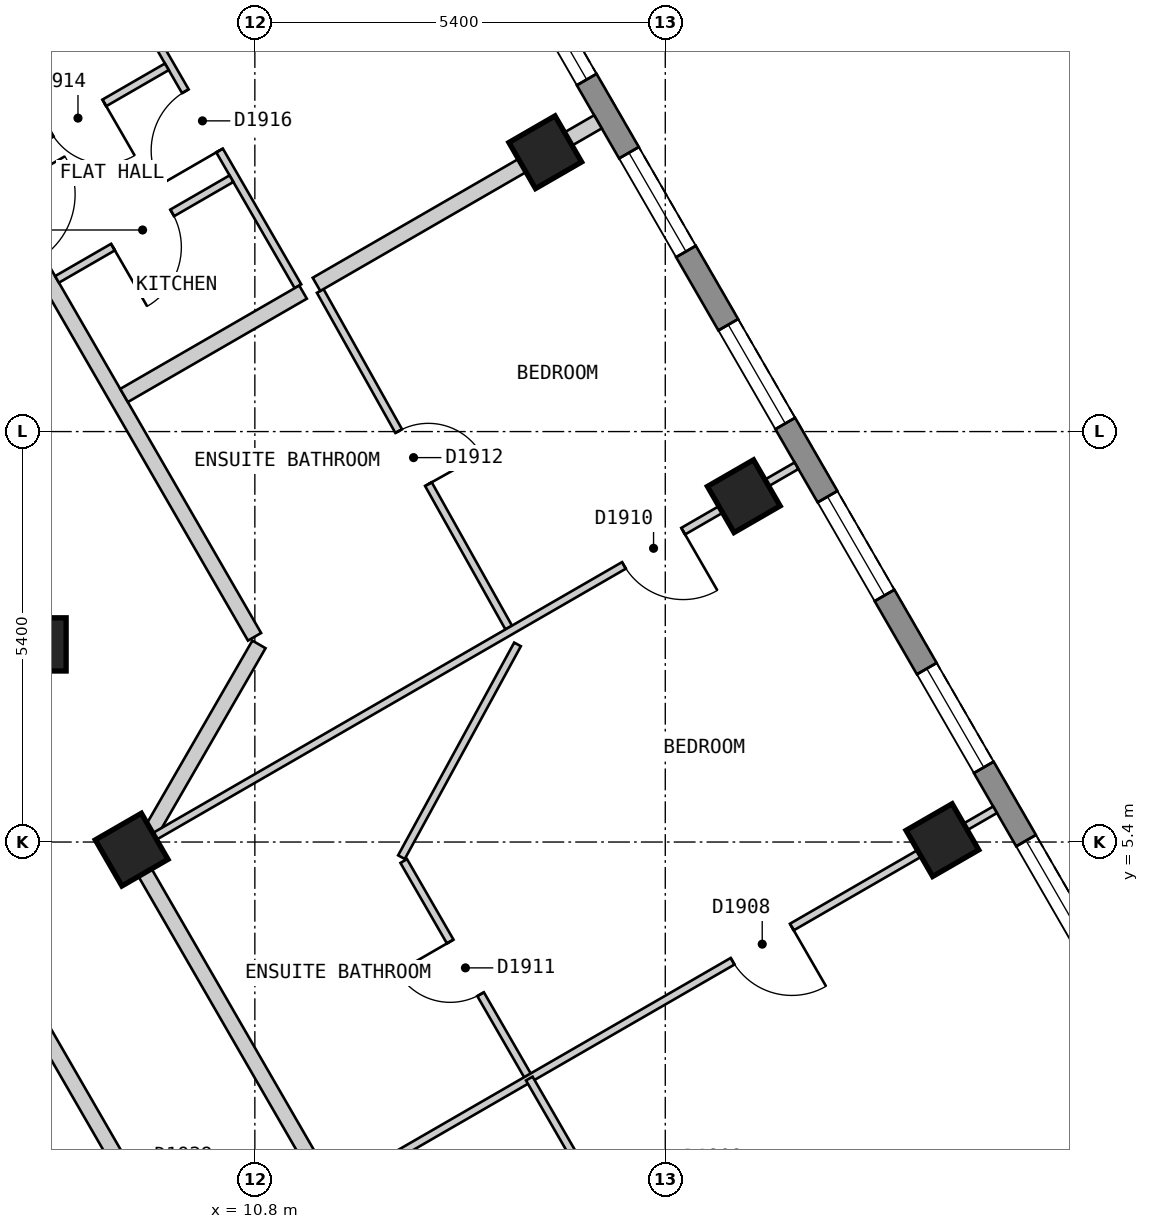
"""IFC4 building model, lengths in metres.
Left out: names, types, materials, properties, quantities, classifications, styles, units other than length and angle.
Written with IfcOpenShell. Run it as: python <this file> out.ifc"""

import sys

from ifc_helpers import new_model, si_unit, direction, frame, frame_2d, origin, origin_2d, place, context, subcontext, project, spatial, polyline, rectangle, outline, extrude, element, fill, save


model = new_model("IFC4")
c1 = context("Model", 3, precision=1e-05, world=origin(), true_north=direction((0.0, 1.0)))
c2 = subcontext(c1, "Body", "Model", "MODEL_VIEW")
j1 = project(units=[si_unit("LENGTHUNIT", "METRE"), si_unit("PLANEANGLEUNIT", "RADIAN")], contexts=[c1])
p1 = place(None, origin())
s1 = spatial("IfcSite", under=j1, at=p1, CompositionType="ELEMENT")
p2 = place(p1, origin())
s2 = spatial("IfcBuilding", under=s1, at=p2, CompositionType="ELEMENT")
p3 = place(p2, frame((0.0, 0.0, 226.8)))
s3 = spatial("IfcBuildingStorey", under=s2, at=p3, CompositionType="ELEMENT", Elevation=226.8)
for number, where, z_axis, x_axis in (
    (1, (19.846, 5.425, 0.0), (0.0, 0.0, 1.0), (-0.5, 0.866, 0.0)),
    (2, (17.233, 9.95, 0.0), (0.0, 0.0, 1.0), (-0.5, 0.866, 0.0)),
    (3, (14.621, 14.475, 0.0), (0.0, 0.0, 1.0), (-0.5, 0.866, 0.0)),
    (4, (9.179, 5.3, 0.0), (0.0, 0.0, 1.0), (-0.5, 0.866, 0.0)),
    (5, (7.967, 8.0, 0.0), (0.0, 0.0, 1.0), (1.0, 0.0, 0.0)),
):
    element("IfcColumn", number, at=place(p3, frame(where, z_axis=z_axis, x_axis=x_axis)), inside=s3, PredefinedType="COLUMN", context=c2, shape_type="SweptSolid", body=[
        extrude(rectangle(XDim=0.7, YDim=0.7, at=origin_2d()), origin(), (0.0, 0.0, 1.0), 3.0),
    ])
p4 = place(p3, frame((23.599, 0.825, 0.0), z_axis=(0.0, 0.0, 1.0), x_axis=(-0.500003656944, 0.866023292436, 0.0)))
e6 = element("IfcWall", 6, at=p4, inside=s3, PredefinedType="SOLIDWALL", context=c2, shape_type="SweptSolid", body=[
    extrude(outline(polyline([(0.0, -0.15), (22.17, -0.15), (22.09, 0.15), (0.08, 0.15), (0.0, -0.15)])), origin(), (0.0, 0.0, 1.0), 2.7),
])
p5 = place(p4, frame((1.191, 0.0, 0.15)))
e7 = element("IfcOpeningElement", 7, at=p5, cuts=e6, PredefinedType="OPENING", context=c2, shape_type="SweptSolid", body=[
    extrude(rectangle(XDim=1.5, YDim=2.1, at=frame_2d((0.75, 1.05))), frame((0.0, 0.16, 0.0), z_axis=(0.0, -1.0, 0.0), x_axis=(1.0, 0.0, 0.0)), (0.0, 0.0, 1.0), 0.32),
])
p6 = place(p4, frame((3.804, 0.0, 0.15)))
e8 = element("IfcOpeningElement", 8, at=p6, cuts=e6, PredefinedType="OPENING", context=c2, shape_type="SweptSolid", body=[
    extrude(rectangle(XDim=1.5, YDim=2.1, at=frame_2d((0.75, 1.05))), frame((0.0, 0.16, 0.0), z_axis=(0.0, -1.0, 0.0), x_axis=(1.0, 0.0, 0.0)), (0.0, 0.0, 1.0), 0.32),
])
p7 = place(p4, frame((6.417, 0.0, 0.15)))
e9 = element("IfcOpeningElement", 9, at=p7, cuts=e6, PredefinedType="OPENING", context=c2, shape_type="SweptSolid", body=[
    extrude(rectangle(XDim=1.5, YDim=2.1, at=frame_2d((0.75, 1.05))), frame((0.0, 0.16, 0.0), z_axis=(0.0, -1.0, 0.0), x_axis=(1.0, 0.0, 0.0)), (0.0, 0.0, 1.0), 0.32),
])
p8 = place(p4, frame((9.029, 0.0, 0.15)))
e10 = element("IfcOpeningElement", 10, at=p8, cuts=e6, PredefinedType="OPENING", context=c2, shape_type="SweptSolid", body=[
    extrude(rectangle(XDim=1.5, YDim=2.1, at=frame_2d((0.75, 1.05))), frame((0.0, 0.16, 0.0), z_axis=(0.0, -1.0, 0.0), x_axis=(1.0, 0.0, 0.0)), (0.0, 0.0, 1.0), 0.32),
])
p9 = place(p4, frame((11.641, 0.0, 0.15)))
e11 = element("IfcOpeningElement", 11, at=p9, cuts=e6, PredefinedType="OPENING", context=c2, shape_type="SweptSolid", body=[
    extrude(rectangle(XDim=1.5, YDim=2.1, at=frame_2d((0.75, 1.05))), frame((0.0, 0.16, 0.0), z_axis=(0.0, -1.0, 0.0), x_axis=(1.0, 0.0, 0.0)), (0.0, 0.0, 1.0), 0.32),
])
p10 = place(p4, frame((14.254, 0.0, 0.15)))
e12 = element("IfcOpeningElement", 12, at=p10, cuts=e6, PredefinedType="OPENING", context=c2, shape_type="SweptSolid", body=[
    extrude(rectangle(XDim=1.5, YDim=2.1, at=frame_2d((0.75, 1.05))), frame((0.0, 0.16, 0.0), z_axis=(0.0, -1.0, 0.0), x_axis=(1.0, 0.0, 0.0)), (0.0, 0.0, 1.0), 0.32),
])
p11 = place(p4, frame((16.866, 0.0, 0.15)))
e13 = element("IfcOpeningElement", 13, at=p11, cuts=e6, PredefinedType="OPENING", context=c2, shape_type="SweptSolid", body=[
    extrude(rectangle(XDim=1.5, YDim=2.1, at=frame_2d((0.75, 1.05))), frame((0.0, 0.16, 0.0), z_axis=(0.0, -1.0, 0.0), x_axis=(1.0, 0.0, 0.0)), (0.0, 0.0, 1.0), 0.32),
])
p12 = place(p4, frame((19.479, 0.0, 0.15)))
e14 = element("IfcOpeningElement", 14, at=p12, cuts=e6, PredefinedType="OPENING", context=c2, shape_type="SweptSolid", body=[
    extrude(rectangle(XDim=1.5, YDim=2.1, at=frame_2d((0.75, 1.05))), frame((0.0, 0.16, 0.0), z_axis=(0.0, -1.0, 0.0), x_axis=(1.0, 0.0, 0.0)), (0.0, 0.0, 1.0), 0.32),
])
p13 = place(p3, frame((8.026, 2.899, 0.0), z_axis=(0.0, 0.0, 1.0), x_axis=(0.499986018985, -0.866033475577, 0.0)))
e15 = element("IfcWall", 15, at=p13, inside=s3, PredefinedType="PARTITIONING", context=c2, shape_type="SweptSolid", body=[
    extrude(rectangle(XDim=5.078, YDim=0.2, at=frame_2d((2.539, 0.0))), origin(), (0.0, 0.0, 1.0), 2.7),
])
p14 = place(p13, frame((2.089, 0.0, 0.0)))
e16 = element("IfcOpeningElement", 16, at=p14, cuts=e15, PredefinedType="OPENING", context=c2, shape_type="SweptSolid", body=[
    extrude(rectangle(XDim=0.9, YDim=2.1, at=frame_2d((0.45, 1.05))), frame((0.0, 0.11, 0.0), z_axis=(0.0, -1.0, 0.0), x_axis=(1.0, 0.0, 0.0)), (0.0, 0.0, 1.0), 0.22),
])
p15 = place(p3, frame((9.238, 5.2, 0.0), z_axis=(0.0, 0.0, 1.0), x_axis=(0.500025705601, -0.86601056214, 0.0)))
e17 = element("IfcWall", 17, at=p15, inside=s3, PredefinedType="PARTITIONING", context=c2, shape_type="SweptSolid", body=[
    extrude(rectangle(XDim=7.735, YDim=0.2, at=frame_2d((3.868, 0.0))), origin(), (0.0, 0.0, 1.0), 2.7),
])
p16 = place(p3, frame((5.485, 17.3, 0.0), z_axis=(0.0, 0.0, 1.0), x_axis=(0.499943285704, -0.866058145322, 0.0)))
e18 = element("IfcWall", 18, at=p16, inside=s3, PredefinedType="PARTITIONING", context=c2, shape_type="SweptSolid", body=[
    extrude(rectangle(XDim=10.623, YDim=0.2, at=frame_2d((5.312, 0.0))), origin(), (0.0, 0.0, 1.0), 2.7),
])
p17 = place(p16, frame((3.901, 0.0, 0.0)))
e19 = element("IfcOpeningElement", 19, at=p17, cuts=e18, PredefinedType="OPENING", context=c2, shape_type="SweptSolid", body=[
    extrude(rectangle(XDim=1.0, YDim=2.1, at=frame_2d((0.5, 1.05))), frame((0.0, 0.11, 0.0), z_axis=(0.0, -1.0, 0.0), x_axis=(1.0, 0.0, 0.0)), (0.0, 0.0, 1.0), 0.22),
])
p18 = place(p3, frame((9.404, 5.487, 0.0), z_axis=(0.0, 0.0, 1.0), x_axis=(0.499768590677, 0.866158966803, 0.0)))
e20 = element("IfcWall", 20, at=p18, inside=s3, PredefinedType="PARTITIONING", context=c2, shape_type="SweptSolid", body=[
    extrude(rectangle(XDim=2.901, YDim=0.2, at=frame_2d((1.451, 0.0))), origin(), (0.0, 0.0, 1.0), 2.7),
])
p19 = place(p3, frame((12.759, 5.15, 0.0), z_axis=(0.0, 0.0, 1.0), x_axis=(0.499905801698, -0.866079782369, 0.0)))
e21 = element("IfcWall", 21, at=p19, inside=s3, PredefinedType="PARTITIONING", context=c2, shape_type="SweptSolid", body=[
    extrude(rectangle(XDim=3.304, YDim=0.1, at=frame_2d((1.652, 0.0))), origin(), (0.0, 0.0, 1.0), 2.7),
])
p20 = place(p19, frame((1.223, 0.0, 0.0)))
e22 = element("IfcOpeningElement", 22, at=p20, cuts=e21, PredefinedType="OPENING", context=c2, shape_type="SweptSolid", body=[
    extrude(rectangle(XDim=0.8, YDim=2.1, at=frame_2d((0.4, 1.05))), frame((0.0, 0.06, 0.0), z_axis=(0.0, -1.0, 0.0), x_axis=(1.0, 0.0, 0.0)), (0.0, 0.0, 1.0), 0.12),
])
p21 = place(p3, frame((8.854, 17.064, 0.0), z_axis=(0.0, 0.0, 1.0), x_axis=(0.500042049778, -0.866001124973, 0.0)))
e23 = element("IfcWall", 23, at=p21, inside=s3, PredefinedType="PARTITIONING", context=c2, shape_type="SweptSolid", body=[
    extrude(rectangle(XDim=5.025, YDim=0.1, at=frame_2d((2.513, 0.0))), origin(), (0.0, 0.0, 1.0), 2.7),
])
p22 = place(p21, frame((2.063, 0.0, 0.0)))
e24 = element("IfcOpeningElement", 24, at=p22, cuts=e23, PredefinedType="OPENING", context=c2, shape_type="SweptSolid", body=[
    extrude(rectangle(XDim=0.9, YDim=2.1, at=frame_2d((0.45, 1.05))), frame((0.0, 0.06, 0.0), z_axis=(0.0, -1.0, 0.0), x_axis=(1.0, 0.0, 0.0)), (0.0, 0.0, 1.0), 0.12),
])
p23 = place(p3, frame((11.66, 12.65, 0.0), z_axis=(0.0, 0.0, 1.0), x_axis=(0.488650242737, -0.872479764965, 0.0)))
e25 = element("IfcWall", 25, at=p23, inside=s3, PredefinedType="PARTITIONING", context=c2, shape_type="SweptSolid", body=[
    extrude(rectangle(XDim=5.075, YDim=0.1, at=frame_2d((2.538, 0.0))), origin(), (0.0, 0.0, 1.0), 2.7),
])
p24 = place(p23, frame((2.113, 0.0, 0.0)))
e26 = element("IfcOpeningElement", 26, at=p24, cuts=e25, PredefinedType="OPENING", context=c2, shape_type="SweptSolid", body=[
    extrude(rectangle(XDim=0.8, YDim=2.1, at=frame_2d((0.4, 1.05))), frame((0.0, 0.06, 0.0), z_axis=(0.0, -1.0, 0.0), x_axis=(1.0, 0.0, 0.0)), (0.0, 0.0, 1.0), 0.12),
])
p25 = place(p3, frame((12.729, 5.201, 0.0), z_axis=(0.0, 0.0, 1.0), x_axis=(0.478932598182, 0.877851676764, 0.0)))
e27 = element("IfcWall", 27, at=p25, inside=s3, PredefinedType="PARTITIONING", context=c2, shape_type="SweptSolid", body=[
    extrude(rectangle(XDim=3.188, YDim=0.1, at=frame_2d((1.594, 0.0))), origin(), (0.0, 0.0, 1.0), 2.7),
])
p26 = place(p3, frame((11.879, 0.826, 0.0), z_axis=(0.0, 0.0, 1.0), x_axis=(0.866065245018, 0.499930986609, 0.0)))
e28 = element("IfcWall", 28, at=p26, inside=s3, PredefinedType="PARTITIONING", context=c2, shape_type="SweptSolid", body=[
    extrude(rectangle(XDim=10.0, YDim=0.1, at=frame_2d((5.0, 0.0))), origin(), (0.0, 0.0, 1.0), 2.7),
])
p27 = place(p26, frame((6.012, 0.0, 0.0)))
e29 = element("IfcOpeningElement", 29, at=p27, cuts=e28, PredefinedType="OPENING", context=c2, shape_type="SweptSolid", body=[
    extrude(rectangle(XDim=0.9, YDim=2.1, at=frame_2d((0.45, 1.05))), frame((0.0, 0.06, 0.0), z_axis=(0.0, -1.0, 0.0), x_axis=(1.0, 0.0, 0.0)), (0.0, 0.0, 1.0), 0.12),
])
p28 = place(p3, frame((9.354, 5.401, 0.0), z_axis=(0.0, 0.0, 1.0), x_axis=(0.866018411306, 0.500012111133, 0.0)))
e30 = element("IfcWall", 30, at=p28, inside=s3, PredefinedType="PARTITIONING", context=c2, shape_type="SweptSolid", body=[
    extrude(rectangle(XDim=9.898, YDim=0.1, at=frame_2d((4.949, 0.0))), origin(), (0.0, 0.0, 1.0), 2.7),
])
p29 = place(p28, frame((7.277, 0.0, 0.0)))
e31 = element("IfcOpeningElement", 31, at=p29, cuts=e30, PredefinedType="OPENING", context=c2, shape_type="SweptSolid", body=[
    extrude(rectangle(XDim=0.9, YDim=2.1, at=frame_2d((0.45, 1.05))), frame((0.0, 0.06, 0.0), z_axis=(0.0, -1.0, 0.0), x_axis=(1.0, 0.0, 0.0)), (0.0, 0.0, 1.0), 0.12),
])
p30 = place(p3, frame((8.197, 12.802, 0.0), z_axis=(0.0, 0.0, 1.0), x_axis=(0.866029095148, 0.499993606316, 0.0)))
e32 = element("IfcWall", 32, at=p30, inside=s3, PredefinedType="PARTITIONING", context=c2, shape_type="SweptSolid", body=[
    extrude(rectangle(XDim=2.65, YDim=0.1, at=frame_2d((1.325, 0.0))), origin(), (0.0, 0.0, 1.0), 2.7),
])
p31 = place(p30, frame((0.85, 0.0, 0.0)))
e33 = element("IfcOpeningElement", 33, at=p31, cuts=e32, PredefinedType="OPENING", context=c2, shape_type="SweptSolid", body=[
    extrude(rectangle(XDim=0.9, YDim=2.1, at=frame_2d((0.45, 1.05))), frame((0.0, 0.06, 0.0), z_axis=(0.0, -1.0, 0.0), x_axis=(1.0, 0.0, 0.0)), (0.0, 0.0, 1.0), 0.12),
])
p32 = place(p3, frame((7.347, 14.274, 0.0), z_axis=(0.0, 0.0, 1.0), x_axis=(0.86601223543, 0.500022807565, 0.0)))
e34 = element("IfcWall", 34, at=p32, inside=s3, PredefinedType="PARTITIONING", context=c2, shape_type="SweptSolid", body=[
    extrude(rectangle(XDim=2.65, YDim=0.1, at=frame_2d((1.325, 0.0))), origin(), (0.0, 0.0, 1.0), 2.7),
])
p33 = place(p32, frame((0.9, 0.0, 0.0)))
e35 = element("IfcOpeningElement", 35, at=p33, cuts=e34, PredefinedType="OPENING", context=c2, shape_type="SweptSolid", body=[
    extrude(rectangle(XDim=0.8, YDim=2.1, at=frame_2d((0.4, 1.05))), frame((0.0, 0.06, 0.0), z_axis=(0.0, -1.0, 0.0), x_axis=(1.0, 0.0, 0.0)), (0.0, 0.0, 1.0), 0.12),
])
p34 = place(p3, frame((9.079, 11.275, 0.0), z_axis=(0.0, 0.0, 1.0), x_axis=(0.865952340496, 0.500126527981, 0.0)))
e36 = element("IfcWall", 36, at=p34, inside=s3, PredefinedType="PARTITIONING", context=c2, shape_type="SweptSolid", body=[
    extrude(rectangle(XDim=2.719, YDim=0.2, at=frame_2d((1.36, 0.0))), origin(), (0.0, 0.0, 1.0), 2.7),
])
p35 = place(p3, frame((11.611, 12.737, 0.0), z_axis=(0.0, 0.0, 1.0), x_axis=(0.866017282483, 0.500014066243, 0.0)))
e37 = element("IfcWall", 37, at=p35, inside=s3, PredefinedType="PARTITIONING", context=c2, shape_type="SweptSolid", body=[
    extrude(rectangle(XDim=4.276, YDim=0.2, at=frame_2d((2.138, 0.0))), origin(), (0.0, 0.0, 1.0), 2.7),
])
p36 = place(p3, frame((14.411, 2.288, 0.0), z_axis=(0.0, 0.0, 1.0), x_axis=(0.500009005995, -0.866020204108, 0.0)))
e38 = element("IfcWall", 38, at=p36, inside=s3, PredefinedType="PARTITIONING", context=c2, shape_type="SweptSolid", body=[
    extrude(rectangle(XDim=1.696, YDim=0.1, at=frame_2d((0.848, 0.0))), origin(), (0.0, 0.0, 1.0), 2.7),
])
p37 = place(p6, origin())
e39 = element("IfcWindow", 39, at=p37, inside=s3, PartitioningType="SINGLE_PANEL", PredefinedType="WINDOW", context=c2, shape_type="SweptSolid", body=[
    extrude(rectangle(XDim=1.5, YDim=2.1, at=frame_2d((0.75, 1.05))), frame((0.0, 0.03, 0.0), z_axis=(0.0, -1.0, 0.0), x_axis=(1.0, 0.0, 0.0)), (0.0, 0.0, 1.0), 0.06),
])
fill(e8, e39)
p38 = place(p7, origin())
e40 = element("IfcWindow", 40, at=p38, inside=s3, PartitioningType="SINGLE_PANEL", PredefinedType="WINDOW", context=c2, shape_type="SweptSolid", body=[
    extrude(rectangle(XDim=1.5, YDim=2.1, at=frame_2d((0.75, 1.05))), frame((0.0, 0.03, 0.0), z_axis=(0.0, -1.0, 0.0), x_axis=(1.0, 0.0, 0.0)), (0.0, 0.0, 1.0), 0.06),
])
fill(e9, e40)
p39 = place(p8, origin())
e41 = element("IfcWindow", 41, at=p39, inside=s3, PartitioningType="SINGLE_PANEL", PredefinedType="WINDOW", context=c2, shape_type="SweptSolid", body=[
    extrude(rectangle(XDim=1.5, YDim=2.1, at=frame_2d((0.75, 1.05))), frame((0.0, 0.03, 0.0), z_axis=(0.0, -1.0, 0.0), x_axis=(1.0, 0.0, 0.0)), (0.0, 0.0, 1.0), 0.06),
])
fill(e10, e41)
p40 = place(p9, origin())
e42 = element("IfcWindow", 42, at=p40, inside=s3, PartitioningType="SINGLE_PANEL", PredefinedType="WINDOW", context=c2, shape_type="SweptSolid", body=[
    extrude(rectangle(XDim=1.5, YDim=2.1, at=frame_2d((0.75, 1.05))), frame((0.0, 0.03, 0.0), z_axis=(0.0, -1.0, 0.0), x_axis=(1.0, 0.0, 0.0)), (0.0, 0.0, 1.0), 0.06),
])
fill(e11, e42)
p41 = place(p10, origin())
e43 = element("IfcWindow", 43, at=p41, inside=s3, PartitioningType="SINGLE_PANEL", PredefinedType="WINDOW", context=c2, shape_type="SweptSolid", body=[
    extrude(rectangle(XDim=1.5, YDim=2.1, at=frame_2d((0.75, 1.05))), frame((0.0, 0.03, 0.0), z_axis=(0.0, -1.0, 0.0), x_axis=(1.0, 0.0, 0.0)), (0.0, 0.0, 1.0), 0.06),
])
fill(e12, e43)
p42 = place(p11, origin())
e44 = element("IfcWindow", 44, at=p42, inside=s3, PartitioningType="SINGLE_PANEL", PredefinedType="WINDOW", context=c2, shape_type="SweptSolid", body=[
    extrude(rectangle(XDim=1.5, YDim=2.1, at=frame_2d((0.75, 1.05))), frame((0.0, 0.03, 0.0), z_axis=(0.0, -1.0, 0.0), x_axis=(1.0, 0.0, 0.0)), (0.0, 0.0, 1.0), 0.06),
])
fill(e13, e44)
p43 = place(p27, origin())
e45 = element("IfcDoor", 45, at=p43, inside=s3, OperationType="SINGLE_SWING_RIGHT", PredefinedType="DOOR", context=c2, shape_type="SweptSolid", body=[
    extrude(rectangle(XDim=0.9, YDim=2.1, at=frame_2d((0.45, 1.05))), frame((0.0, 0.025, 0.0), z_axis=(0.0, -1.0, 0.0), x_axis=(1.0, 0.0, 0.0)), (0.0, 0.0, 1.0), 0.05),
])
fill(e29, e45)
p44 = place(p29, origin())
e46 = element("IfcDoor", 46, at=p44, inside=s3, OperationType="SINGLE_SWING_RIGHT", PredefinedType="DOOR", context=c2, shape_type="SweptSolid", body=[
    extrude(rectangle(XDim=0.9, YDim=2.1, at=frame_2d((0.45, 1.05))), frame((0.0, 0.025, 0.0), z_axis=(0.0, -1.0, 0.0), x_axis=(1.0, 0.0, 0.0)), (0.0, 0.0, 1.0), 0.05),
])
fill(e31, e46)
p45 = place(p20, origin())
e47 = element("IfcDoor", 47, at=p45, inside=s3, OperationType="SINGLE_SWING_LEFT", PredefinedType="DOOR", context=c2, shape_type="SweptSolid", body=[
    extrude(rectangle(XDim=0.8, YDim=2.1, at=frame_2d((0.4, 1.05))), frame((0.0, 0.025, 0.0), z_axis=(0.0, -1.0, 0.0), x_axis=(1.0, 0.0, 0.0)), (0.0, 0.0, 1.0), 0.05),
])
fill(e22, e47)
p46 = place(p24, origin())
e48 = element("IfcDoor", 48, at=p46, inside=s3, OperationType="SINGLE_SWING_RIGHT", PredefinedType="DOOR", context=c2, shape_type="SweptSolid", body=[
    extrude(rectangle(XDim=0.8, YDim=2.1, at=frame_2d((0.4, 1.05))), frame((0.0, 0.025, 0.0), z_axis=(0.0, -1.0, 0.0), x_axis=(1.0, 0.0, 0.0)), (0.0, 0.0, 1.0), 0.05),
])
fill(e26, e48)
p47 = place(p33, origin())
e49 = element("IfcDoor", 49, at=p47, inside=s3, OperationType="SINGLE_SWING_RIGHT", PredefinedType="DOOR", context=c2, shape_type="SweptSolid", body=[
    extrude(rectangle(XDim=0.8, YDim=2.1, at=frame_2d((0.4, 1.05))), frame((0.0, 0.025, 0.0), z_axis=(0.0, -1.0, 0.0), x_axis=(1.0, 0.0, 0.0)), (0.0, 0.0, 1.0), 0.05),
])
fill(e35, e49)
p48 = place(p31, origin())
e50 = element("IfcDoor", 50, at=p48, inside=s3, OperationType="SINGLE_SWING_LEFT", PredefinedType="DOOR", context=c2, shape_type="SweptSolid", body=[
    extrude(rectangle(XDim=0.9, YDim=2.1, at=frame_2d((0.45, 1.05))), frame((0.0, 0.025, 0.0), z_axis=(0.0, -1.0, 0.0), x_axis=(1.0, 0.0, 0.0)), (0.0, 0.0, 1.0), 0.05),
])
fill(e33, e50)
p49 = place(p22, origin())
e51 = element("IfcDoor", 51, at=p49, inside=s3, OperationType="SINGLE_SWING_RIGHT", PredefinedType="DOOR", context=c2, shape_type="SweptSolid", body=[
    extrude(rectangle(XDim=0.9, YDim=2.1, at=frame_2d((0.45, 1.05))), frame((0.0, 0.025, 0.0), z_axis=(0.0, -1.0, 0.0), x_axis=(1.0, 0.0, 0.0)), (0.0, 0.0, 1.0), 0.05),
])
fill(e24, e51)
save(model, sys.argv[1])
